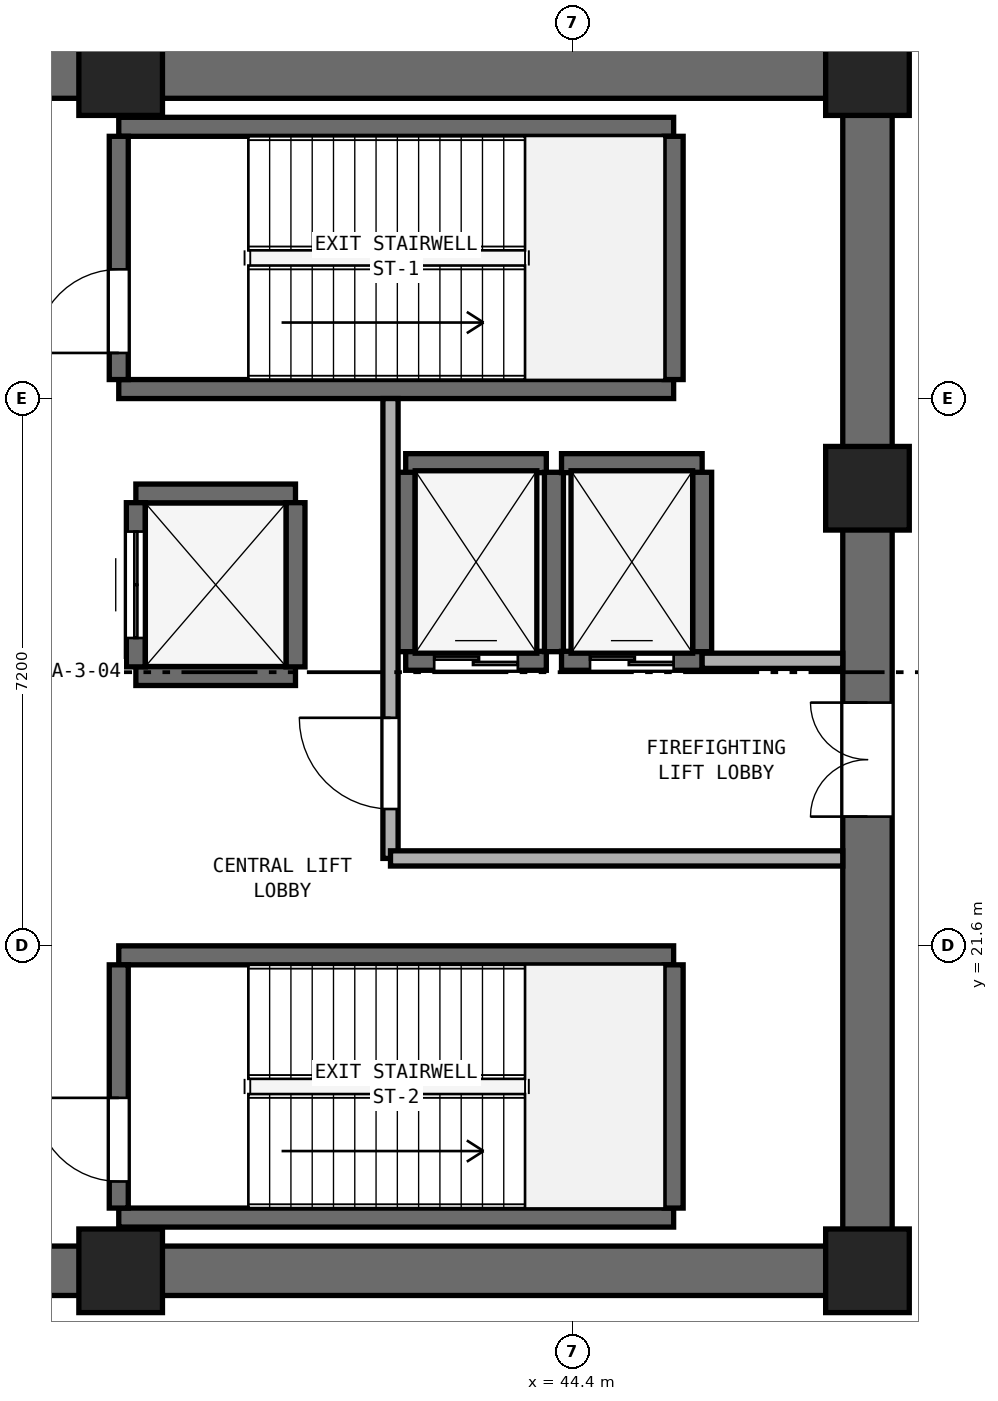
"""IFC4 building model, lengths in metres.
Left out: names, types, materials, properties, quantities, classifications, styles, units other than length and angle.
Written with IfcOpenShell. Run it as: python <this file> out.ifc"""

import sys

from ifc_helpers import new_model, si_unit, direction, frame, frame_2d, origin, origin_2d, place, context, subcontext, project, spatial, rectangle, extrude, element, fill, save


model = new_model("IFC4")
c1 = context("Model", 3, precision=1e-05, world=origin(), true_north=direction((0.0, 1.0)))
c2 = subcontext(c1, "Body", "Model", "MODEL_VIEW")
j1 = project(units=[si_unit("LENGTHUNIT", "METRE"), si_unit("PLANEANGLEUNIT", "RADIAN")], contexts=[c1])
p1 = place(None, origin())
s1 = spatial("IfcSite", under=j1, at=p1, CompositionType="ELEMENT")
p2 = place(p1, origin())
s2 = spatial("IfcBuilding", under=s1, at=p2, CompositionType="ELEMENT")
p3 = place(p2, frame((0.0, 0.0, 120.0)))
s3 = spatial("IfcBuildingStorey", under=s2, at=p3, CompositionType="ELEMENT", Elevation=120.0)
for number, where, z_axis, x_axis in (
    (1, (25.4, 17.325, 0.0), (0.0, 0.0, 1.0), (1.0, 0.0, 0.0)),
    (2, (25.4, 33.075, 0.0), (0.0, 0.0, 1.0), (1.0, 0.0, 0.0)),
):
    element("IfcWall", number, at=place(p3, frame(where, z_axis=z_axis, x_axis=x_axis)), inside=s3, PredefinedType="SHEAR", context=c2, shape_type="SweptSolid", body=[
        extrude(rectangle(XDim=23.2, YDim=0.65, at=frame_2d((11.6, 0.0))), origin(), (0.0, 0.0, 1.0), 4.6),
    ])
p4 = place(p3, frame((48.275, 17.65, 0.0), z_axis=(0.0, 0.0, 1.0), x_axis=(0.0, 1.0, 0.0)))
e3 = element("IfcWall", 3, at=p4, inside=s3, PredefinedType="SHEAR", context=c2, shape_type="SweptSolid", body=[
    extrude(rectangle(XDim=15.1, YDim=0.65, at=frame_2d((7.55, 0.0))), origin(), (0.0, 0.0, 1.0), 4.6),
])
p5 = place(p4, frame((5.65, 0.0, 0.0)))
e4 = element("IfcOpeningElement", 4, at=p5, cuts=e3, PredefinedType="OPENING", context=c2, shape_type="SweptSolid", body=[
    extrude(rectangle(XDim=1.5, YDim=2.15, at=frame_2d((0.75, 1.075))), frame((0.0, 0.335, 0.0), z_axis=(0.0, -1.0, 0.0), x_axis=(1.0, 0.0, 0.0)), (0.0, 0.0, 1.0), 0.67),
])
for number, where, z_axis, x_axis in (
    (5, (38.45, 17.325, 0.0), (0.0, 0.0, 1.0), (1.0, 0.0, 0.0)),
    (6, (48.275, 17.325, 0.0), (0.0, 0.0, 1.0), (1.0, 0.0, 0.0)),
    (7, (48.275, 27.62, 0.0), (0.0, 0.0, 1.0), (1.0, 0.0, 0.0)),
    (8, (48.275, 33.075, 0.0), (0.0, 0.0, 1.0), (1.0, 0.0, 0.0)),
    (9, (38.45, 33.075, 0.0), (0.0, 0.0, 1.0), (1.0, 0.0, 0.0)),
):
    element("IfcColumn", number, at=place(p3, frame(where, z_axis=z_axis, x_axis=x_axis)), inside=s3, PredefinedType="PILASTER", context=c2, shape_type="SweptSolid", body=[
        extrude(rectangle(XDim=1.1, YDim=1.1, at=origin_2d()), origin(), (0.0, 0.0, 1.0), 5.0),
    ])
for number, where, z_axis, x_axis in (
    (10, (38.425, 28.925, 0.0), (0.0, 0.0, 1.0), (1.0, 0.0, 0.0)),
    (11, (38.425, 32.375, 0.0), (0.0, 0.0, 1.0), (1.0, 0.0, 0.0)),
):
    element("IfcWall", number, at=place(p3, frame(where, z_axis=z_axis, x_axis=x_axis)), inside=s3, PredefinedType="SHEAR", context=c2, shape_type="SweptSolid", body=[
        extrude(rectangle(XDim=7.3, YDim=0.25, at=frame_2d((3.65, 0.0))), origin(), (0.0, 0.0, 1.0), 4.6),
    ])
p6 = place(p3, frame((38.425, 29.05, 0.0), z_axis=(0.0, 0.0, 1.0), x_axis=(0.0, 1.0, 0.0)))
e12 = element("IfcWall", 12, at=p6, inside=s3, PredefinedType="SHEAR", context=c2, shape_type="SweptSolid", body=[
    extrude(rectangle(XDim=3.2, YDim=0.25, at=frame_2d((1.6, 0.0))), origin(), (0.0, 0.0, 1.0), 4.6),
])
p7 = place(p6, frame((0.35, 0.0, 0.0)))
e13 = element("IfcOpeningElement", 13, at=p7, cuts=e12, PredefinedType="OPENING", context=c2, shape_type="SweptSolid", body=[
    extrude(rectangle(XDim=1.1, YDim=2.15, at=frame_2d((0.55, 1.075))), frame((0.0, 0.135, 0.0), z_axis=(0.0, -1.0, 0.0), x_axis=(1.0, 0.0, 0.0)), (0.0, 0.0, 1.0), 0.27),
])
p8 = place(p3, frame((45.725, 29.05, 0.0), z_axis=(0.0, 0.0, 1.0), x_axis=(0.0, 1.0, 0.0)))
e14 = element("IfcWall", 14, at=p8, inside=s3, PredefinedType="SHEAR", context=c2, shape_type="SweptSolid", body=[
    extrude(rectangle(XDim=3.2, YDim=0.25, at=frame_2d((1.6, 0.0))), origin(), (0.0, 0.0, 1.0), 4.6),
])
for number, where, z_axis, x_axis in (
    (15, (38.425, 18.025, 0.0), (0.0, 0.0, 1.0), (1.0, 0.0, 0.0)),
    (16, (38.425, 21.475, 0.0), (0.0, 0.0, 1.0), (1.0, 0.0, 0.0)),
):
    element("IfcWall", number, at=place(p3, frame(where, z_axis=z_axis, x_axis=x_axis)), inside=s3, PredefinedType="SHEAR", context=c2, shape_type="SweptSolid", body=[
        extrude(rectangle(XDim=7.3, YDim=0.25, at=frame_2d((3.65, 0.0))), origin(), (0.0, 0.0, 1.0), 4.6),
    ])
p9 = place(p3, frame((38.425, 18.15, 0.0), z_axis=(0.0, 0.0, 1.0), x_axis=(0.0, 1.0, 0.0)))
e17 = element("IfcWall", 17, at=p9, inside=s3, PredefinedType="SHEAR", context=c2, shape_type="SweptSolid", body=[
    extrude(rectangle(XDim=3.2, YDim=0.25, at=frame_2d((1.6, 0.0))), origin(), (0.0, 0.0, 1.0), 4.6),
])
p10 = place(p9, frame((0.35, 0.0, 0.0)))
e18 = element("IfcOpeningElement", 18, at=p10, cuts=e17, PredefinedType="OPENING", context=c2, shape_type="SweptSolid", body=[
    extrude(rectangle(XDim=1.1, YDim=2.15, at=frame_2d((0.55, 1.075))), frame((0.0, 0.135, 0.0), z_axis=(0.0, -1.0, 0.0), x_axis=(1.0, 0.0, 0.0)), (0.0, 0.0, 1.0), 0.27),
])
p11 = place(p3, frame((45.725, 18.15, 0.0), z_axis=(0.0, 0.0, 1.0), x_axis=(0.0, 1.0, 0.0)))
e19 = element("IfcWall", 19, at=p11, inside=s3, PredefinedType="SHEAR", context=c2, shape_type="SweptSolid", body=[
    extrude(rectangle(XDim=3.2, YDim=0.25, at=frame_2d((1.6, 0.0))), origin(), (0.0, 0.0, 1.0), 4.6),
])
p12 = place(p3, frame((42.2, 25.35, 0.0), z_axis=(0.0, 0.0, 1.0), x_axis=(1.0, 0.0, 0.0)))
e20 = element("IfcWall", 20, at=p12, inside=s3, PredefinedType="SHEAR", context=c2, shape_type="SweptSolid", body=[
    extrude(rectangle(XDim=1.85, YDim=0.25, at=frame_2d((0.925, 0.0))), origin(), (0.0, 0.0, 1.0), 4.6),
])
p13 = place(p12, frame((0.375, 0.0, 0.0)))
e21 = element("IfcOpeningElement", 21, at=p13, cuts=e20, PredefinedType="OPENING", context=c2, shape_type="SweptSolid", body=[
    extrude(rectangle(XDim=1.1, YDim=2.15, at=frame_2d((0.55, 1.075))), frame((0.0, 0.135, 0.0), z_axis=(0.0, -1.0, 0.0), x_axis=(1.0, 0.0, 0.0)), (0.0, 0.0, 1.0), 0.27),
])
p14 = place(p3, frame((42.2, 27.95, 0.0), z_axis=(0.0, 0.0, 1.0), x_axis=(1.0, 0.0, 0.0)))
e22 = element("IfcWall", 22, at=p14, inside=s3, PredefinedType="SHEAR", context=c2, shape_type="SweptSolid", body=[
    extrude(rectangle(XDim=1.85, YDim=0.25, at=frame_2d((0.925, 0.0))), origin(), (0.0, 0.0, 1.0), 4.6),
])
for number, where, z_axis, x_axis in (
    (23, (42.2, 25.47, 0.0), (0.0, 0.0, 1.0), (0.0, 1.0, 0.0)),
    (24, (44.15, 25.47, 0.0), (0.0, 0.0, 1.0), (0.0, 1.0, 0.0)),
):
    element("IfcWall", number, at=place(p3, frame(where, z_axis=z_axis, x_axis=x_axis)), inside=s3, PredefinedType="SHEAR", context=c2, shape_type="SweptSolid", body=[
        extrude(rectangle(XDim=2.36, YDim=0.25, at=frame_2d((1.18, 0.0))), origin(), (0.0, 0.0, 1.0), 4.6),
    ])
p15 = place(p3, frame((44.25, 25.35, 0.0), z_axis=(0.0, 0.0, 1.0), x_axis=(1.0, 0.0, 0.0)))
e25 = element("IfcWall", 25, at=p15, inside=s3, PredefinedType="SHEAR", context=c2, shape_type="SweptSolid", body=[
    extrude(rectangle(XDim=1.85, YDim=0.25, at=frame_2d((0.925, 0.0))), origin(), (0.0, 0.0, 1.0), 4.6),
])
p16 = place(p15, frame((0.375, 0.0, 0.0)))
e26 = element("IfcOpeningElement", 26, at=p16, cuts=e25, PredefinedType="OPENING", context=c2, shape_type="SweptSolid", body=[
    extrude(rectangle(XDim=1.1, YDim=2.15, at=frame_2d((0.55, 1.075))), frame((0.0, 0.135, 0.0), z_axis=(0.0, -1.0, 0.0), x_axis=(1.0, 0.0, 0.0)), (0.0, 0.0, 1.0), 0.27),
])
p17 = place(p3, frame((44.25, 27.95, 0.0), z_axis=(0.0, 0.0, 1.0), x_axis=(1.0, 0.0, 0.0)))
e27 = element("IfcWall", 27, at=p17, inside=s3, PredefinedType="SHEAR", context=c2, shape_type="SweptSolid", body=[
    extrude(rectangle(XDim=1.85, YDim=0.25, at=frame_2d((0.925, 0.0))), origin(), (0.0, 0.0, 1.0), 4.6),
])
p18 = place(p3, frame((46.1, 25.47, 0.0), z_axis=(0.0, 0.0, 1.0), x_axis=(0.0, 1.0, 0.0)))
e28 = element("IfcWall", 28, at=p18, inside=s3, PredefinedType="SHEAR", context=c2, shape_type="SweptSolid", body=[
    extrude(rectangle(XDim=2.36, YDim=0.25, at=frame_2d((1.18, 0.0))), origin(), (0.0, 0.0, 1.0), 4.6),
])
for number, where, z_axis, x_axis in (
    (29, (38.65, 25.15, 0.0), (0.0, 0.0, 1.0), (1.0, 0.0, 0.0)),
    (30, (38.65, 27.55, 0.0), (0.0, 0.0, 1.0), (1.0, 0.0, 0.0)),
):
    element("IfcWall", number, at=place(p3, frame(where, z_axis=z_axis, x_axis=x_axis)), inside=s3, PredefinedType="SHEAR", context=c2, shape_type="SweptSolid", body=[
        extrude(rectangle(XDim=2.1, YDim=0.25, at=frame_2d((1.05, 0.0))), origin(), (0.0, 0.0, 1.0), 4.6),
    ])
p19 = place(p3, frame((38.65, 25.27, 0.0), z_axis=(0.0, 0.0, 1.0), x_axis=(0.0, 1.0, 0.0)))
e31 = element("IfcWall", 31, at=p19, inside=s3, PredefinedType="SHEAR", context=c2, shape_type="SweptSolid", body=[
    extrude(rectangle(XDim=2.16, YDim=0.25, at=frame_2d((1.08, 0.0))), origin(), (0.0, 0.0, 1.0), 4.6),
])
p20 = place(p19, frame((0.38, 0.0, 0.0)))
e32 = element("IfcOpeningElement", 32, at=p20, cuts=e31, PredefinedType="OPENING", context=c2, shape_type="SweptSolid", body=[
    extrude(rectangle(XDim=1.4, YDim=2.2, at=frame_2d((0.7, 1.1))), frame((0.0, 0.135, 0.0), z_axis=(0.0, -1.0, 0.0), x_axis=(1.0, 0.0, 0.0)), (0.0, 0.0, 1.0), 0.27),
])
p21 = place(p3, frame((40.75, 25.27, 0.0), z_axis=(0.0, 0.0, 1.0), x_axis=(0.0, 1.0, 0.0)))
e33 = element("IfcWall", 33, at=p21, inside=s3, PredefinedType="SHEAR", context=c2, shape_type="SweptSolid", body=[
    extrude(rectangle(XDim=2.16, YDim=0.25, at=frame_2d((1.08, 0.0))), origin(), (0.0, 0.0, 1.0), 4.6),
])
p22 = place(p3, frame((42.0, 22.75, 0.0), z_axis=(0.0, 0.0, 1.0), x_axis=(0.0, 1.0, 0.0)))
e34 = element("IfcWall", 34, at=p22, inside=s3, PredefinedType="SOLIDWALL", context=c2, shape_type="SweptSolid", body=[
    extrude(rectangle(XDim=6.05, YDim=0.2, at=frame_2d((3.025, 0.0))), origin(), (0.0, 0.0, 1.0), 4.6),
])
p23 = place(p22, frame((0.65, 0.0, 0.0)))
e35 = element("IfcOpeningElement", 35, at=p23, cuts=e34, PredefinedType="OPENING", context=c2, shape_type="SweptSolid", body=[
    extrude(rectangle(XDim=1.2, YDim=2.15, at=frame_2d((0.6, 1.075))), frame((0.0, 0.11, 0.0), z_axis=(0.0, -1.0, 0.0), x_axis=(1.0, 0.0, 0.0)), (0.0, 0.0, 1.0), 0.22),
])
p24 = place(p3, frame((42.0, 22.75, 0.0), z_axis=(0.0, 0.0, 1.0), x_axis=(1.0, 0.0, 0.0)))
e36 = element("IfcWall", 36, at=p24, inside=s3, PredefinedType="SOLIDWALL", context=c2, shape_type="SweptSolid", body=[
    extrude(rectangle(XDim=5.95, YDim=0.2, at=frame_2d((2.975, 0.0))), origin(), (0.0, 0.0, 1.0), 4.6),
])
p25 = place(p3, frame((46.1, 25.35, 0.0), z_axis=(0.0, 0.0, 1.0), x_axis=(1.0, 0.0, 0.0)))
e37 = element("IfcWall", 37, at=p25, inside=s3, PredefinedType="SOLIDWALL", context=c2, shape_type="SweptSolid", body=[
    extrude(rectangle(XDim=1.85, YDim=0.2, at=frame_2d((0.925, 0.0))), origin(), (0.0, 0.0, 1.0), 4.6),
])
p26 = place(p7, origin())
e38 = element("IfcDoor", 38, at=p26, inside=s3, OperationType="SINGLE_SWING_LEFT", PredefinedType="DOOR", context=c2, shape_type="SweptSolid", body=[
    extrude(rectangle(XDim=1.1, YDim=2.15, at=frame_2d((0.55, 1.075))), frame((0.0, 0.025, 0.0), z_axis=(0.0, -1.0, 0.0), x_axis=(1.0, 0.0, 0.0)), (0.0, 0.0, 1.0), 0.05),
])
fill(e13, e38)
p27 = place(p10, origin())
e39 = element("IfcDoor", 39, at=p27, inside=s3, OperationType="SINGLE_SWING_RIGHT", PredefinedType="DOOR", context=c2, shape_type="SweptSolid", body=[
    extrude(rectangle(XDim=1.1, YDim=2.15, at=frame_2d((0.55, 1.075))), frame((0.0, 0.025, 0.0), z_axis=(0.0, -1.0, 0.0), x_axis=(1.0, 0.0, 0.0)), (0.0, 0.0, 1.0), 0.05),
])
fill(e18, e39)
p28 = place(p13, origin())
e40 = element("IfcDoor", 40, at=p28, inside=s3, OperationType="DOUBLE_DOOR_SLIDING", PredefinedType="DOOR", context=c2, shape_type="SweptSolid", body=[
    extrude(rectangle(XDim=1.1, YDim=2.15, at=frame_2d((0.55, 1.075))), frame((0.0, 0.025, 0.0), z_axis=(0.0, -1.0, 0.0), x_axis=(1.0, 0.0, 0.0)), (0.0, 0.0, 1.0), 0.05),
])
fill(e21, e40)
p29 = place(p16, origin())
e41 = element("IfcDoor", 41, at=p29, inside=s3, OperationType="DOUBLE_DOOR_SLIDING", PredefinedType="DOOR", context=c2, shape_type="SweptSolid", body=[
    extrude(rectangle(XDim=1.1, YDim=2.15, at=frame_2d((0.55, 1.075))), frame((0.0, 0.025, 0.0), z_axis=(0.0, -1.0, 0.0), x_axis=(1.0, 0.0, 0.0)), (0.0, 0.0, 1.0), 0.05),
])
fill(e26, e41)
p30 = place(p20, origin())
e42 = element("IfcDoor", 42, at=p30, inside=s3, OperationType="DOUBLE_DOOR_SLIDING", PredefinedType="DOOR", context=c2, shape_type="SweptSolid", body=[
    extrude(rectangle(XDim=1.4, YDim=2.2, at=frame_2d((0.7, 1.1))), frame((0.0, 0.025, 0.0), z_axis=(0.0, -1.0, 0.0), x_axis=(1.0, 0.0, 0.0)), (0.0, 0.0, 1.0), 0.05),
])
fill(e32, e42)
p31 = place(p23, origin())
e43 = element("IfcDoor", 43, at=p31, inside=s3, OperationType="SINGLE_SWING_RIGHT", PredefinedType="DOOR", context=c2, shape_type="SweptSolid", body=[
    extrude(rectangle(XDim=1.2, YDim=2.15, at=frame_2d((0.6, 1.075))), frame((0.0, 0.025, 0.0), z_axis=(0.0, -1.0, 0.0), x_axis=(1.0, 0.0, 0.0)), (0.0, 0.0, 1.0), 0.05),
])
fill(e35, e43)
p32 = place(p5, origin())
e44 = element("IfcDoor", 44, at=p32, inside=s3, OperationType="DOUBLE_DOOR_SINGLE_SWING", PredefinedType="DOOR", context=c2, shape_type="SweptSolid", body=[
    extrude(rectangle(XDim=1.5, YDim=2.15, at=frame_2d((0.75, 1.075))), frame((0.0, 0.025, 0.0), z_axis=(0.0, -1.0, 0.0), x_axis=(1.0, 0.0, 0.0)), (0.0, 0.0, 1.0), 0.05),
])
fill(e4, e44)
save(model, sys.argv[1])
